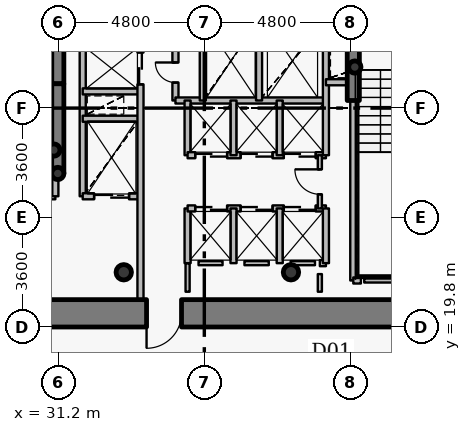
"""IFC4 building model, lengths in metres.
Left out: names, types, materials, properties, quantities, classifications, styles, units other than length and angle.
Written with IfcOpenShell. Run it as: python <this file> out.ifc"""

import sys

from ifc_helpers import new_model, si_unit, direction, frame, frame_2d, origin, origin_2d, place, context, subcontext, project, spatial, rectangle, hollow_circle, extrude, source, transform, mapped, element, fill, save


model = new_model("IFC4")
c1 = context("Model", 3, precision=1e-05, world=origin(), true_north=direction((0.0, 1.0)))
c2 = subcontext(c1, "Body", "Model", "MODEL_VIEW")
j1 = project(units=[si_unit("LENGTHUNIT", "METRE"), si_unit("PLANEANGLEUNIT", "RADIAN")], contexts=[c1])
p1 = place(None, origin())
s1 = spatial("IfcSite", under=j1, at=p1, CompositionType="ELEMENT")
p2 = place(p1, origin())
s2 = spatial("IfcBuilding", under=s1, at=p2, CompositionType="ELEMENT")
p3 = place(p2, origin())
s3 = spatial("IfcBuildingStorey", under=s2, at=p3, CompositionType="ELEMENT", Elevation=0.0)
for number, where, z_axis, x_axis in (
    (1, (33.35, 21.6, 0.0), (0.0, 0.0, 1.0), (1.0, 0.0, 0.0)),
    (2, (38.85, 21.6, 0.0), (0.0, 0.0, 1.0), (1.0, 0.0, 0.0)),
):
    element("IfcColumn", number, at=place(p3, frame(where, z_axis=z_axis, x_axis=x_axis)), inside=s3, PredefinedType="COLUMN", context=c2, shape_type="SweptSolid", body=[
        extrude(hollow_circle(Radius=0.254, WallThickness=0.02, at=origin_2d()), origin(), (0.0, 0.0, 1.0), 6.0),
    ])
p4 = place(p3, frame((31.18, 27.8, 0.0), z_axis=(0.0, 0.0, 1.0), x_axis=(0.0, 1.0, 0.0)))
e3 = element("IfcWall", 3, at=p4, inside=s3, PredefinedType="SHEAR", context=c2, shape_type="SweptSolid", body=[
    extrude(rectangle(XDim=4.9, YDim=0.4, at=frame_2d((2.45, 0.0))), origin(), (0.0, 0.0, 1.0), 6.0),
])
for number, where, z_axis, x_axis in (
    (4, (31.05, 25.62, 0.0), (0.0, 0.0, 1.0), (1.0, 0.0, 0.0)),
    (5, (31.18, 24.85, 0.0), (0.0, 0.0, 1.0), (1.0, 0.0, 0.0)),
    (6, (40.95, 28.35, 0.0), (0.0, 0.0, 1.0), (1.0, 0.0, 0.0)),
):
    element("IfcColumn", number, at=place(p3, frame(where, z_axis=z_axis, x_axis=x_axis)), inside=s3, PredefinedType="COLUMN", context=c2, shape_type="SweptSolid", body=[
        extrude(hollow_circle(Radius=0.203, WallThickness=0.016, at=origin_2d()), origin(), (0.0, 0.0, 1.0), 6.0),
    ])
p5 = place(p3, frame((45.25, 20.25, 0.0), z_axis=(0.0, 0.0, 1.0), x_axis=(-1.0, 0.0, 0.0)))
e7 = element("IfcWall", 7, at=p5, inside=s3, PredefinedType="SHEAR", context=c2, shape_type="SweptSolid", body=[
    extrude(rectangle(XDim=18.5, YDim=0.9, at=frame_2d((9.25, 0.0))), origin(), (0.0, 0.0, 1.0), 5.15),
])
p6 = place(p5, frame((10.0, 0.0, 0.0)))
e8 = element("IfcOpeningElement", 8, at=p6, cuts=e7, PredefinedType="OPENING", context=c2, shape_type="SweptSolid", body=[
    extrude(rectangle(XDim=1.15, YDim=2.15, at=origin_2d()), frame((0.575, 0.46, 1.075), z_axis=(0.0, -1.0, 0.0), x_axis=(1.0, 0.0, 0.0)), (0.0, 0.0, 1.0), 0.92),
])
p7 = place(p3, frame((31.18, 24.85, 0.0), z_axis=(0.0, 0.0, 1.0), x_axis=(0.0, 1.0, 0.0)))
e9 = element("IfcWall", 9, at=p7, inside=s3, PredefinedType="SHEAR", context=c2, shape_type="SweptSolid", body=[
    extrude(rectangle(XDim=2.95, YDim=0.4, at=frame_2d((1.475, 0.0))), origin(), (0.0, 0.0, 1.0), 5.3),
])
p8 = place(p3, frame((40.9, 27.25, 0.0), z_axis=(0.0, 0.0, 1.0), x_axis=(0.0, 1.0, 0.0)))
e10 = element("IfcWall", 10, at=p8, inside=s3, PredefinedType="SHEAR", context=c2, shape_type="SweptSolid", body=[
    extrude(rectangle(XDim=2.6, YDim=0.4, at=frame_2d((1.3, 0.0))), origin(), (0.0, 0.0, 1.0), 5.3),
])
p9 = place(p3, frame((27.56, 24.1, 0.0), z_axis=(0.0, 0.0, 1.0), x_axis=(1.0, 0.0, 0.0)))
e11 = element("IfcWall", 11, at=p9, inside=s3, PredefinedType="PARTITIONING", context=c2, shape_type="SweptSolid", body=[
    extrude(rectangle(XDim=3.54, YDim=0.2, at=frame_2d((1.77, 0.0))), origin(), (0.0, 0.0, 1.0), 5.7),
])
p10 = place(p9, frame((1.17, 0.0, 0.0)))
e12 = element("IfcOpeningElement", 12, at=p10, cuts=e11, PredefinedType="OPENING", context=c2, shape_type="SweptSolid", body=[
    extrude(rectangle(XDim=1.2, YDim=2.15, at=origin_2d()), frame((0.6, 0.11, 1.075), z_axis=(0.0, -1.0, 0.0), x_axis=(1.0, 0.0, 0.0)), (0.0, 0.0, 1.0), 0.22),
])
p11 = place(p3, frame((31.1, 24.1, 0.0), z_axis=(0.0, 0.0, 1.0), x_axis=(0.0, 1.0, 0.0)))
e13 = element("IfcWall", 13, at=p11, inside=s3, PredefinedType="PARTITIONING", context=c2, shape_type="SweptSolid", body=[
    extrude(rectangle(XDim=0.74, YDim=0.2, at=frame_2d((0.37, 0.0))), origin(), (0.0, 0.0, 1.0), 5.7),
])
p12 = place(p3, frame((32.0, 24.1, 0.0), z_axis=(0.0, 0.0, 1.0), x_axis=(0.0, 1.0, 0.0)))
e14 = element("IfcWall", 14, at=p12, inside=s3, PredefinedType="PARTITIONING", context=c2, shape_type="SweptSolid", body=[
    extrude(rectangle(XDim=8.0, YDim=0.2, at=frame_2d((4.0, 0.0))), origin(), (0.0, 0.0, 1.0), 5.7),
])
p13 = place(p3, frame((32.0, 24.1, 0.0), z_axis=(0.0, 0.0, 1.0), x_axis=(1.0, 0.0, 0.0)))
e15 = element("IfcWall", 15, at=p13, inside=s3, PredefinedType="PARTITIONING", context=c2, shape_type="SweptSolid", body=[
    extrude(rectangle(XDim=1.9, YDim=0.2, at=frame_2d((0.95, 0.0))), origin(), (0.0, 0.0, 1.0), 5.285),
])
p14 = place(p13, frame((0.375, 0.0, 0.0)))
e16 = element("IfcOpeningElement", 16, at=p14, cuts=e15, PredefinedType="OPENING", context=c2, shape_type="SweptSolid", body=[
    extrude(rectangle(XDim=1.15, YDim=2.15, at=origin_2d()), frame((0.575, 0.11, 1.075), z_axis=(0.0, -1.0, 0.0), x_axis=(1.0, 0.0, 0.0)), (0.0, 0.0, 1.0), 0.22),
])
for number, where, z_axis, x_axis in (
    (17, (32.0, 26.65, 0.0), (0.0, 0.0, 1.0), (1.0, 0.0, 0.0)),
    (18, (32.0, 27.55, 0.0), (0.0, 0.0, 1.0), (1.0, 0.0, 0.0)),
):
    element("IfcWall", number, at=place(p3, frame(where, z_axis=z_axis, x_axis=x_axis)), inside=s3, PredefinedType="PARTITIONING", context=c2, shape_type="SweptSolid", body=[
        extrude(rectangle(XDim=1.9, YDim=0.2, at=frame_2d((0.95, 0.0))), origin(), (0.0, 0.0, 1.0), 5.285),
    ])
p15 = place(p3, frame((33.9, 20.7, 0.0), z_axis=(0.0, 0.0, 1.0), x_axis=(0.0, 1.0, 0.0)))
e19 = element("IfcWall", 19, at=p15, inside=s3, PredefinedType="PARTITIONING", context=c2, shape_type="SweptSolid", body=[
    extrude(rectangle(XDim=11.4, YDim=0.2, at=frame_2d((5.7, 0.0))), origin(), (0.0, 0.0, 1.0), 5.285),
])
p16 = place(p15, frame((7.08, 0.0, 0.0)))
e20 = element("IfcOpeningElement", 20, at=p16, cuts=e19, PredefinedType="OPENING", context=c2, shape_type="SweptSolid", body=[
    extrude(rectangle(XDim=1.05, YDim=2.15, at=origin_2d()), frame((0.525, 0.11, 1.075), z_axis=(0.0, -1.0, 0.0), x_axis=(1.0, 0.0, 0.0)), (0.0, 0.0, 1.0), 0.22),
])
p17 = place(p15, frame((8.595, 0.0, 0.0)))
e21 = element("IfcOpeningElement", 21, at=p17, cuts=e19, PredefinedType="OPENING", context=c2, shape_type="SweptSolid", body=[
    extrude(rectangle(XDim=1.05, YDim=2.15, at=origin_2d()), frame((0.525, 0.11, 1.075), z_axis=(0.0, -1.0, 0.0), x_axis=(1.0, 0.0, 0.0)), (0.0, 0.0, 1.0), 0.22),
])
p18 = place(p15, frame((10.095, 0.0, 0.0)))
e22 = element("IfcOpeningElement", 22, at=p18, cuts=e19, PredefinedType="OPENING", context=c2, shape_type="SweptSolid", body=[
    extrude(rectangle(XDim=1.05, YDim=2.15, at=origin_2d()), frame((0.525, 0.11, 1.075), z_axis=(0.0, -1.0, 0.0), x_axis=(1.0, 0.0, 0.0)), (0.0, 0.0, 1.0), 0.22),
])
p19 = place(p3, frame((35.05, 27.25, 0.0), z_axis=(0.0, 0.0, 1.0), x_axis=(0.0, 1.0, 0.0)))
e23 = element("IfcWall", 23, at=p19, inside=s3, PredefinedType="PARTITIONING", context=c2, shape_type="SweptSolid", body=[
    extrude(rectangle(XDim=3.6, YDim=0.2, at=frame_2d((1.8, 0.0))), origin(), (0.0, 0.0, 1.0), 5.7),
])
p20 = place(p19, frame((0.59, 0.0, 0.0)))
e24 = element("IfcOpeningElement", 24, at=p20, cuts=e23, PredefinedType="OPENING", context=c2, shape_type="SweptSolid", body=[
    extrude(rectangle(XDim=0.66, YDim=2.05, at=origin_2d()), frame((0.33, 0.11, 1.025), z_axis=(0.0, -1.0, 0.0), x_axis=(1.0, 0.0, 0.0)), (0.0, 0.0, 1.0), 0.22),
])
p21 = place(p19, frame((2.35, 0.0, 0.0)))
e25 = element("IfcOpeningElement", 25, at=p21, cuts=e23, PredefinedType="OPENING", context=c2, shape_type="SweptSolid", body=[
    extrude(rectangle(XDim=0.66, YDim=2.05, at=origin_2d()), frame((0.33, 0.11, 1.025), z_axis=(0.0, -1.0, 0.0), x_axis=(1.0, 0.0, 0.0)), (0.0, 0.0, 1.0), 0.22),
])
p22 = place(p3, frame((35.05, 27.25, 0.0), z_axis=(0.0, 0.0, 1.0), x_axis=(1.0, 0.0, 0.0)))
e26 = element("IfcWall", 26, at=p22, inside=s3, PredefinedType="PARTITIONING", context=c2, shape_type="SweptSolid", body=[
    extrude(rectangle(XDim=4.95, YDim=0.2, at=frame_2d((2.475, 0.0))), origin(), (0.0, 0.0, 1.0), 5.285),
])
p23 = place(p3, frame((35.45, 21.9, 0.0), z_axis=(0.0, 0.0, 1.0), x_axis=(0.0, 1.0, 0.0)))
e27 = element("IfcWall", 27, at=p23, inside=s3, PredefinedType="PARTITIONING", context=c2, shape_type="SweptSolid", body=[
    extrude(rectangle(XDim=1.8, YDim=0.2, at=frame_2d((0.9, 0.0))), origin(), (0.0, 0.0, 1.0), 5.7),
])
p24 = place(p3, frame((35.45, 23.7, 0.0), z_axis=(0.0, 0.0, 1.0), x_axis=(1.0, 0.0, 0.0)))
e28 = element("IfcWall", 28, at=p24, inside=s3, PredefinedType="PARTITIONING", context=c2, shape_type="SweptSolid", body=[
    extrude(rectangle(XDim=4.55, YDim=0.2, at=frame_2d((2.275, 0.0))), origin(), (0.0, 0.0, 1.0), 5.285),
])
p25 = place(p24, frame((0.25, 0.0, 0.0)))
e29 = element("IfcOpeningElement", 29, at=p25, cuts=e28, PredefinedType="OPENING", context=c2, shape_type="SweptSolid", body=[
    extrude(rectangle(XDim=1.05, YDim=2.15, at=origin_2d()), frame((0.525, 0.11, 1.075), z_axis=(0.0, -1.0, 0.0), x_axis=(1.0, 0.0, 0.0)), (0.0, 0.0, 1.0), 0.22),
])
p26 = place(p24, frame((1.745, 0.0, 0.0)))
e30 = element("IfcOpeningElement", 30, at=p26, cuts=e28, PredefinedType="OPENING", context=c2, shape_type="SweptSolid", body=[
    extrude(rectangle(XDim=1.05, YDim=2.15, at=origin_2d()), frame((0.525, 0.11, 1.075), z_axis=(0.0, -1.0, 0.0), x_axis=(1.0, 0.0, 0.0)), (0.0, 0.0, 1.0), 0.22),
])
p27 = place(p24, frame((3.165, 0.0, 0.0)))
e31 = element("IfcOpeningElement", 31, at=p27, cuts=e28, PredefinedType="OPENING", context=c2, shape_type="SweptSolid", body=[
    extrude(rectangle(XDim=1.05, YDim=2.15, at=origin_2d()), frame((0.525, 0.11, 1.075), z_axis=(0.0, -1.0, 0.0), x_axis=(1.0, 0.0, 0.0)), (0.0, 0.0, 1.0), 0.22),
])
p28 = place(p3, frame((35.45, 25.45, 0.0), z_axis=(0.0, 0.0, 1.0), x_axis=(0.0, 1.0, 0.0)))
e32 = element("IfcWall", 32, at=p28, inside=s3, PredefinedType="PARTITIONING", context=c2, shape_type="SweptSolid", body=[
    extrude(rectangle(XDim=1.8, YDim=0.2, at=frame_2d((0.9, 0.0))), origin(), (0.0, 0.0, 1.0), 5.7),
])
p29 = place(p3, frame((35.45, 25.45, 0.0), z_axis=(0.0, 0.0, 1.0), x_axis=(1.0, 0.0, 0.0)))
e33 = element("IfcWall", 33, at=p29, inside=s3, PredefinedType="PARTITIONING", context=c2, shape_type="SweptSolid", body=[
    extrude(rectangle(XDim=4.55, YDim=0.2, at=frame_2d((2.275, 0.0))), origin(), (0.0, 0.0, 1.0), 5.285),
])
p30 = place(p29, frame((0.25, 0.0, 0.0)))
e34 = element("IfcOpeningElement", 34, at=p30, cuts=e33, PredefinedType="OPENING", context=c2, shape_type="SweptSolid", body=[
    extrude(rectangle(XDim=1.05, YDim=2.15, at=origin_2d()), frame((0.525, 0.11, 1.075), z_axis=(0.0, -1.0, 0.0), x_axis=(1.0, 0.0, 0.0)), (0.0, 0.0, 1.0), 0.22),
])
p31 = place(p29, frame((1.745, 0.0, 0.0)))
e35 = element("IfcOpeningElement", 35, at=p31, cuts=e33, PredefinedType="OPENING", context=c2, shape_type="SweptSolid", body=[
    extrude(rectangle(XDim=1.05, YDim=2.15, at=origin_2d()), frame((0.525, 0.11, 1.075), z_axis=(0.0, -1.0, 0.0), x_axis=(1.0, 0.0, 0.0)), (0.0, 0.0, 1.0), 0.22),
])
p32 = place(p29, frame((3.165, 0.0, 0.0)))
e36 = element("IfcOpeningElement", 36, at=p32, cuts=e33, PredefinedType="OPENING", context=c2, shape_type="SweptSolid", body=[
    extrude(rectangle(XDim=1.05, YDim=2.15, at=origin_2d()), frame((0.525, 0.11, 1.075), z_axis=(0.0, -1.0, 0.0), x_axis=(1.0, 0.0, 0.0)), (0.0, 0.0, 1.0), 0.22),
])
p33 = place(p3, frame((35.95, 27.25, 0.0), z_axis=(0.0, 0.0, 1.0), x_axis=(0.0, 1.0, 0.0)))
e37 = element("IfcWall", 37, at=p33, inside=s3, PredefinedType="PARTITIONING", context=c2, shape_type="SweptSolid", body=[
    extrude(rectangle(XDim=3.8, YDim=0.2, at=frame_2d((1.9, 0.0))), origin(), (0.0, 0.0, 1.0), 5.7),
])
for number, where, z_axis, x_axis in (
    (38, (36.96, 21.9, 0.0), (0.0, 0.0, 1.0), (0.0, 1.0, 0.0)),
    (39, (36.96, 25.45, 0.0), (0.0, 0.0, 1.0), (0.0, 1.0, 0.0)),
):
    element("IfcWall", number, at=place(p3, frame(where, z_axis=z_axis, x_axis=x_axis)), inside=s3, PredefinedType="PARTITIONING", context=c2, shape_type="SweptSolid", body=[
        extrude(rectangle(XDim=1.8, YDim=0.2, at=frame_2d((0.9, 0.0))), origin(), (0.0, 0.0, 1.0), 5.7),
    ])
p34 = place(p3, frame((37.8, 27.25, 0.0), z_axis=(0.0, 0.0, 1.0), x_axis=(0.0, 1.0, 0.0)))
e40 = element("IfcWall", 40, at=p34, inside=s3, PredefinedType="PARTITIONING", context=c2, shape_type="SweptSolid", body=[
    extrude(rectangle(XDim=2.6, YDim=0.2, at=frame_2d((1.3, 0.0))), origin(), (0.0, 0.0, 1.0), 5.7),
])
for number, where, z_axis, x_axis in (
    (41, (38.48, 21.9, 0.0), (0.0, 0.0, 1.0), (0.0, 1.0, 0.0)),
    (42, (38.48, 25.45, 0.0), (0.0, 0.0, 1.0), (0.0, 1.0, 0.0)),
):
    element("IfcWall", number, at=place(p3, frame(where, z_axis=z_axis, x_axis=x_axis)), inside=s3, PredefinedType="PARTITIONING", context=c2, shape_type="SweptSolid", body=[
        extrude(rectangle(XDim=1.8, YDim=0.2, at=frame_2d((0.9, 0.0))), origin(), (0.0, 0.0, 1.0), 5.7),
    ])
p35 = place(p3, frame((39.8, 21.9, 0.0), z_axis=(0.0, 0.0, 1.0), x_axis=(1.0, 0.0, 0.0)))
e43 = element("IfcWall", 43, at=p35, inside=s3, PredefinedType="PARTITIONING", context=c2, shape_type="SweptSolid", body=[
    extrude(rectangle(XDim=0.2, YDim=0.2, at=frame_2d((0.1, 0.0))), origin(), (0.0, 0.0, 1.0), 5.7),
])
p36 = place(p3, frame((39.8, 23.7, 0.0), z_axis=(0.0, 0.0, 1.0), x_axis=(0.0, 1.0, 0.0)))
e44 = element("IfcWall", 44, at=p36, inside=s3, PredefinedType="PARTITIONING", context=c2, shape_type="SweptSolid", body=[
    extrude(rectangle(XDim=1.75, YDim=0.135, at=frame_2d((0.875, 0.0))), origin(), (0.0, 0.0, 1.0), 5.7),
])
p37 = place(p36, frame((0.465, 0.0, 0.0)))
e45 = element("IfcOpeningElement", 45, at=p37, cuts=e44, PredefinedType="OPENING", context=c2, shape_type="SweptSolid", body=[
    extrude(rectangle(XDim=0.82, YDim=2.1, at=origin_2d()), frame((0.41, 0.078, 1.05), z_axis=(0.0, -1.0, 0.0), x_axis=(1.0, 0.0, 0.0)), (0.0, 0.0, 1.0), 0.155),
])
p38 = place(p3, frame((40.0, 21.9, 0.0), z_axis=(0.0, 0.0, 1.0), x_axis=(0.0, 1.0, 0.0)))
e46 = element("IfcWall", 46, at=p38, inside=s3, PredefinedType="PARTITIONING", context=c2, shape_type="SweptSolid", body=[
    extrude(rectangle(XDim=1.8, YDim=0.2, at=frame_2d((0.9, 0.0))), origin(), (0.0, 0.0, 1.0), 5.7),
])
p39 = place(p3, frame((40.0, 25.45, 0.0), z_axis=(0.0, 0.0, 1.0), x_axis=(0.0, 1.0, 0.0)))
e47 = element("IfcWall", 47, at=p39, inside=s3, PredefinedType="PARTITIONING", context=c2, shape_type="SweptSolid", body=[
    extrude(rectangle(XDim=4.4, YDim=0.2, at=frame_2d((2.2, 0.0))), origin(), (0.0, 0.0, 1.0), 5.7),
])
p40 = place(p3, frame((40.0, 27.85, 0.0), z_axis=(0.0, 0.0, 1.0), x_axis=(1.0, 0.0, 0.0)))
e48 = element("IfcWall", 48, at=p40, inside=s3, PredefinedType="PARTITIONING", context=c2, shape_type="SweptSolid", body=[
    extrude(rectangle(XDim=0.9, YDim=0.2, at=frame_2d((0.45, 0.0))), origin(), (0.0, 0.0, 1.0), 5.7),
])
p41 = place(p3, frame((40.9, 21.33, 0.0), z_axis=(0.0, 0.0, 1.0), x_axis=(0.0, 1.0, 0.0)))
e49 = element("IfcWall", 49, at=p41, inside=s3, PredefinedType="PARTITIONING", context=c2, shape_type="SweptSolid", body=[
    extrude(rectangle(XDim=5.91, YDim=0.2, at=frame_2d((2.955, 0.0))), origin(), (0.0, 0.0, 1.0), 5.235),
])
p42 = place(p3, frame((40.9, 21.33, 0.0), z_axis=(0.0, 0.0, 1.0), x_axis=(1.0, 0.0, 0.0)))
e50 = element("IfcWall", 50, at=p42, inside=s3, PredefinedType="PARTITIONING", context=c2, shape_type="SweptSolid", body=[
    extrude(rectangle(XDim=0.25, YDim=0.2, at=frame_2d((0.125, 0.0))), origin(), (0.0, 0.0, 1.0), 5.235),
])
p43 = place(p3, frame((44.08, 21.33, 0.0), z_axis=(0.0, 0.0, 1.0), x_axis=(-1.0, 0.0, 0.0)))
e51 = element("IfcWall", 51, at=p43, inside=s3, PredefinedType="PARTITIONING", context=c2, shape_type="SweptSolid", body=[
    extrude(rectangle(XDim=2.82, YDim=0.135, at=frame_2d((1.41, 0.0))), origin(), (0.0, 0.0, 1.0), 5.235),
])
p44 = place(p3, frame((36.6, 21.9, 0.0), z_axis=(0.0, 0.0, 1.0), x_axis=(-1.0, 0.0, 0.0)))
e52 = element("IfcWall", 52, at=p44, inside=s3, PredefinedType="PARTITIONING", context=c2, shape_type="SweptSolid", body=[
    extrude(rectangle(XDim=0.79, YDim=0.135, at=frame_2d((0.395, 0.0))), origin(), (0.0, 0.0, 1.0), 5.7),
])
p45 = place(p3, frame((38.12, 21.9, 0.0), z_axis=(0.0, 0.0, 1.0), x_axis=(-1.0, 0.0, 0.0)))
e53 = element("IfcWall", 53, at=p45, inside=s3, PredefinedType="PARTITIONING", context=c2, shape_type="SweptSolid", body=[
    extrude(rectangle(XDim=0.8, YDim=0.135, at=frame_2d((0.4, 0.0))), origin(), (0.0, 0.0, 1.0), 5.7),
])
p46 = place(p3, frame((39.64, 21.9, 0.0), z_axis=(0.0, 0.0, 1.0), x_axis=(-1.0, 0.0, 0.0)))
e54 = element("IfcWall", 54, at=p46, inside=s3, PredefinedType="PARTITIONING", context=c2, shape_type="SweptSolid", body=[
    extrude(rectangle(XDim=0.8, YDim=0.135, at=frame_2d((0.4, 0.0))), origin(), (0.0, 0.0, 1.0), 5.285),
])
p47 = place(p3, frame((39.8, 20.96, 0.0), z_axis=(0.0, 0.0, 1.0), x_axis=(0.0, 1.0, 0.0)))
e55 = element("IfcWall", 55, at=p47, inside=s3, PredefinedType="PARTITIONING", context=c2, shape_type="SweptSolid", body=[
    extrude(rectangle(XDim=0.58, YDim=0.135, at=frame_2d((0.29, 0.0))), origin(), (0.0, 0.0, 1.0), 5.235),
])
p48 = place(p3, frame((35.45, 21.89, 0.0), z_axis=(0.0, 0.0, 1.0), x_axis=(0.0, -1.0, 0.0)))
e56 = element("IfcWall", 56, at=p48, inside=s3, PredefinedType="PARTITIONING", context=c2, shape_type="SweptSolid", body=[
    extrude(rectangle(XDim=0.93, YDim=0.135, at=frame_2d((0.465, 0.0))), origin(), (0.0, 0.0, 1.0), 5.285),
])
m1 = source(origin(), c2, "Body", "SweptSolid", [
    extrude(rectangle(XDim=1.15, YDim=2.15, at=origin_2d()), frame((0.575, 0.025, 1.075), z_axis=(0.0, -1.0, 0.0), x_axis=(1.0, 0.0, 0.0)), (0.0, 0.0, 1.0), 0.05),
])
p49 = place(p6, origin())
e57 = element("IfcDoor", 57, at=p49, inside=s3, OperationType="SINGLE_SWING_RIGHT", PredefinedType="DOOR", context=c2, shape_type="MappedRepresentation", body=[
    mapped(m1, transform((0.0, 0.0, 0.0), x_axis=(1.0, 0.0, 0.0), y_axis=(0.0, 1.0, 0.0), z_axis=(0.0, 0.0, 1.0), scale=1.0)),
])
fill(e8, e57)
m2 = source(origin(), c2, "Body", "SweptSolid", [
    extrude(rectangle(XDim=1.15, YDim=2.15, at=origin_2d()), frame((0.575, 0.025, 1.075), z_axis=(0.0, -1.0, 0.0), x_axis=(1.0, 0.0, 0.0)), (0.0, 0.0, 1.0), 0.05),
])
p50 = place(p14, origin())
e58 = element("IfcDoor", 58, at=p50, inside=s3, OperationType="DOUBLE_DOOR_SLIDING", PredefinedType="USERDEFINED", context=c2, shape_type="MappedRepresentation", body=[
    mapped(m2, transform((0.0, 0.0, 0.0), x_axis=(1.0, 0.0, 0.0), y_axis=(0.0, 1.0, 0.0), z_axis=(0.0, 0.0, 1.0), scale=1.0)),
])
fill(e16, e58)
m3 = source(origin(), c2, "Body", "SweptSolid", [
    extrude(rectangle(XDim=1.05, YDim=2.15, at=origin_2d()), frame((0.525, 0.025, 1.075), z_axis=(0.0, -1.0, 0.0), x_axis=(1.0, 0.0, 0.0)), (0.0, 0.0, 1.0), 0.05),
])
p51 = place(p25, origin())
e59 = element("IfcDoor", 59, at=p51, inside=s3, OperationType="DOUBLE_DOOR_SLIDING", PredefinedType="USERDEFINED", context=c2, shape_type="MappedRepresentation", body=[
    mapped(m3, transform((0.0, 0.0, 0.0), x_axis=(1.0, 0.0, 0.0), y_axis=(0.0, 1.0, 0.0), z_axis=(0.0, 0.0, 1.0), scale=1.0)),
])
fill(e29, e59)
p52 = place(p26, origin())
e60 = element("IfcDoor", 60, at=p52, inside=s3, OperationType="DOUBLE_DOOR_SLIDING", PredefinedType="USERDEFINED", context=c2, shape_type="MappedRepresentation", body=[
    mapped(m3, transform((0.0, 0.0, 0.0), x_axis=(1.0, 0.0, 0.0), y_axis=(0.0, 1.0, 0.0), z_axis=(0.0, 0.0, 1.0), scale=1.0)),
])
fill(e30, e60)
p53 = place(p27, origin())
e61 = element("IfcDoor", 61, at=p53, inside=s3, OperationType="DOUBLE_DOOR_SLIDING", PredefinedType="USERDEFINED", context=c2, shape_type="MappedRepresentation", body=[
    mapped(m3, transform((0.0, 0.0, 0.0), x_axis=(1.0, 0.0, 0.0), y_axis=(0.0, 1.0, 0.0), z_axis=(0.0, 0.0, 1.0), scale=1.0)),
])
fill(e31, e61)
p54 = place(p16, origin())
e62 = element("IfcDoor", 62, at=p54, inside=s3, OperationType="DOUBLE_DOOR_SLIDING", PredefinedType="USERDEFINED", context=c2, shape_type="MappedRepresentation", body=[
    mapped(m3, transform((0.0, 0.0, 0.0), x_axis=(1.0, 0.0, 0.0), y_axis=(0.0, 1.0, 0.0), z_axis=(0.0, 0.0, 1.0), scale=1.0)),
])
fill(e20, e62)
p55 = place(p30, origin())
e63 = element("IfcDoor", 63, at=p55, inside=s3, OperationType="DOUBLE_DOOR_SLIDING", PredefinedType="USERDEFINED", context=c2, shape_type="MappedRepresentation", body=[
    mapped(m3, transform((0.0, 0.0, 0.0), x_axis=(1.0, 0.0, 0.0), y_axis=(0.0, 1.0, 0.0), z_axis=(0.0, 0.0, 1.0), scale=1.0)),
])
fill(e34, e63)
p56 = place(p31, origin())
e64 = element("IfcDoor", 64, at=p56, inside=s3, OperationType="DOUBLE_DOOR_SLIDING", PredefinedType="USERDEFINED", context=c2, shape_type="MappedRepresentation", body=[
    mapped(m3, transform((0.0, 0.0, 0.0), x_axis=(1.0, 0.0, 0.0), y_axis=(0.0, 1.0, 0.0), z_axis=(0.0, 0.0, 1.0), scale=1.0)),
])
fill(e35, e64)
p57 = place(p32, origin())
e65 = element("IfcDoor", 65, at=p57, inside=s3, OperationType="DOUBLE_DOOR_SLIDING", PredefinedType="USERDEFINED", context=c2, shape_type="MappedRepresentation", body=[
    mapped(m3, transform((0.0, 0.0, 0.0), x_axis=(1.0, 0.0, 0.0), y_axis=(0.0, 1.0, 0.0), z_axis=(0.0, 0.0, 1.0), scale=1.0)),
])
fill(e36, e65)
m4 = source(origin(), c2, "Body", "SweptSolid", [
    extrude(rectangle(XDim=0.66, YDim=2.05, at=origin_2d()), frame((0.33, 0.025, 1.025), z_axis=(0.0, -1.0, 0.0), x_axis=(1.0, 0.0, 0.0)), (0.0, 0.0, 1.0), 0.05),
])
p58 = place(p20, origin())
e66 = element("IfcDoor", 66, at=p58, inside=s3, OperationType="SINGLE_SWING_RIGHT", PredefinedType="USERDEFINED", context=c2, shape_type="MappedRepresentation", body=[
    mapped(m4, transform((0.0, 0.0, 0.0), x_axis=(1.0, 0.0, 0.0), y_axis=(0.0, 1.0, 0.0), z_axis=(0.0, 0.0, 1.0), scale=1.0)),
])
fill(e24, e66)
m5 = source(origin(), c2, "Body", "SweptSolid", [
    extrude(rectangle(XDim=0.82, YDim=2.1, at=origin_2d()), frame((0.41, 0.025, 1.05), z_axis=(0.0, -1.0, 0.0), x_axis=(1.0, 0.0, 0.0)), (0.0, 0.0, 1.0), 0.05),
])
p59 = place(p37, origin())
e67 = element("IfcDoor", 67, at=p59, inside=s3, OperationType="SINGLE_SWING_RIGHT", PredefinedType="DOOR", context=c2, shape_type="MappedRepresentation", body=[
    mapped(m5, transform((0.0, 0.0, 0.0), x_axis=(1.0, 0.0, 0.0), y_axis=(0.0, 1.0, 0.0), z_axis=(0.0, 0.0, 1.0), scale=1.0)),
])
fill(e45, e67)
save(model, sys.argv[1])
